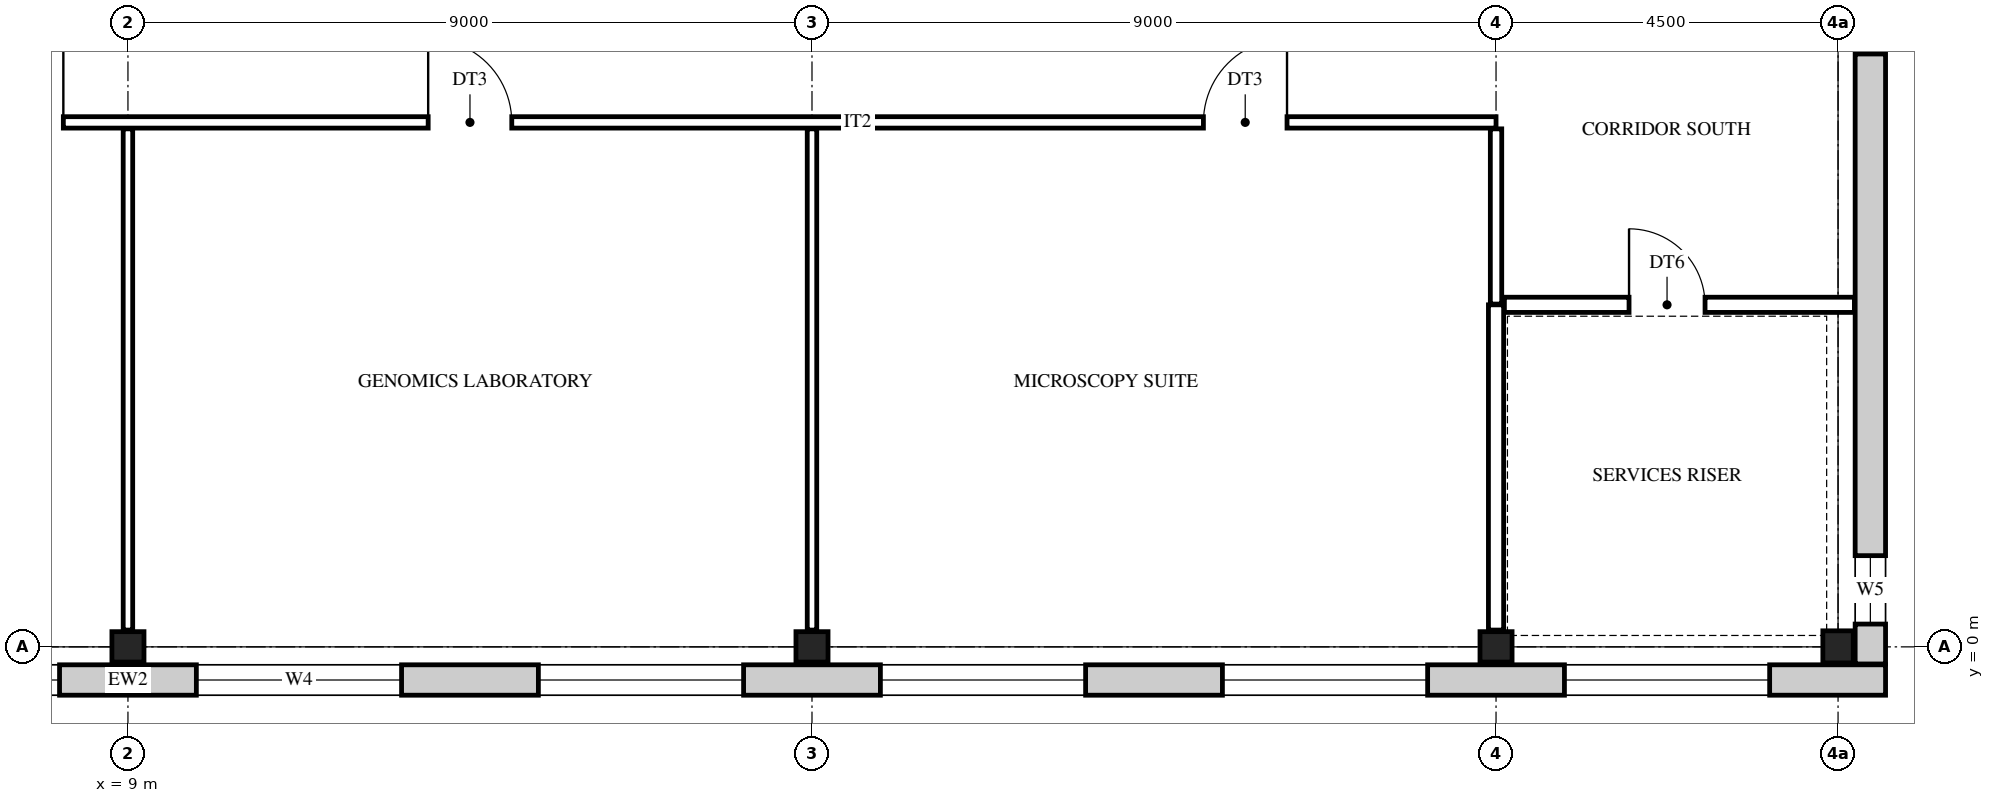
"""IFC4 building model, lengths in metres.
Left out: names, types, materials, properties, quantities, classifications, styles, units other than length and angle.
Written with IfcOpenShell. Run it as: python <this file> out.ifc"""

import sys

from ifc_helpers import new_model, si_unit, direction, frame, frame_2d, origin, origin_2d, place, context, subcontext, project, spatial, rectangle, i_section, extrude, element, fill, save


model = new_model("IFC4")
c1 = context("Model", 3, precision=1e-05, world=origin(), true_north=direction((0.0, 1.0)))
c2 = subcontext(c1, "Body", "Model", "MODEL_VIEW")
j1 = project(units=[si_unit("LENGTHUNIT", "METRE"), si_unit("PLANEANGLEUNIT", "RADIAN")], contexts=[c1])
p1 = place(None, origin())
s1 = spatial("IfcSite", under=j1, at=p1, CompositionType="ELEMENT")
p2 = place(p1, origin())
s2 = spatial("IfcBuilding", under=s1, at=p2, CompositionType="ELEMENT")
p3 = place(p2, frame((0.0, 0.0, 19.2)))
s3 = spatial("IfcBuildingStorey", under=s2, at=p3, CompositionType="ELEMENT", Elevation=19.2)
for number, where, z_axis, x_axis in (
    (1, (9.0, 0.0, 0.0), (0.0, 0.0, 1.0), (0.0, 1.0, 0.0)),
    (2, (18.0, 0.0, 0.0), (0.0, 0.0, 1.0), (0.0, 1.0, 0.0)),
    (3, (27.0, 0.0, 0.0), (0.0, 0.0, 1.0), (0.0, 1.0, 0.0)),
    (4, (31.5, 0.0, 0.0), (0.0, 0.0, 1.0), (1.0, 0.0, 0.0)),
):
    element("IfcColumn", number, at=place(p3, frame(where, z_axis=z_axis, x_axis=x_axis)), inside=s3, PredefinedType="COLUMN", context=c2, shape_type="SweptSolid", body=[
        extrude(i_section(OverallWidth=0.4, OverallDepth=0.422, WebThickness=0.028, FlangeThickness=0.036, at=origin_2d()), origin(), (0.0, 0.0, 1.0), 4.2),
    ])
p4 = place(p3, frame((32.125, -0.436, 0.0), z_axis=(0.0, 0.0, 1.0), x_axis=(-1.0, 0.0, 0.0)))
e5 = element("IfcWall", 5, at=p4, inside=s3, PredefinedType="STANDARD", context=c2, shape_type="SweptSolid", body=[
    extrude(rectangle(XDim=32.75, YDim=0.4, at=frame_2d((16.375, 0.0))), origin(), (0.0, 0.0, 1.0), 4.2),
])
p5 = place(p4, frame((28.525, 0.0, 0.9)))
e6 = element("IfcOpeningElement", 6, at=p5, cuts=e5, PredefinedType="OPENING", context=c2, shape_type="SweptSolid", body=[
    extrude(rectangle(XDim=2.7, YDim=2.5, at=frame_2d((1.35, 1.25))), frame((0.0, 0.21, 0.0), z_axis=(0.0, -1.0, 0.0), x_axis=(1.0, 0.0, 0.0)), (0.0, 0.0, 1.0), 0.42),
])
p6 = place(p4, frame((24.025, 0.0, 0.9)))
e7 = element("IfcOpeningElement", 7, at=p6, cuts=e5, PredefinedType="OPENING", context=c2, shape_type="SweptSolid", body=[
    extrude(rectangle(XDim=2.7, YDim=2.5, at=frame_2d((1.35, 1.25))), frame((0.0, 0.21, 0.0), z_axis=(0.0, -1.0, 0.0), x_axis=(1.0, 0.0, 0.0)), (0.0, 0.0, 1.0), 0.42),
])
p7 = place(p4, frame((19.525, 0.0, 0.9)))
e8 = element("IfcOpeningElement", 8, at=p7, cuts=e5, PredefinedType="OPENING", context=c2, shape_type="SweptSolid", body=[
    extrude(rectangle(XDim=2.7, YDim=2.5, at=frame_2d((1.35, 1.25))), frame((0.0, 0.21, 0.0), z_axis=(0.0, -1.0, 0.0), x_axis=(1.0, 0.0, 0.0)), (0.0, 0.0, 1.0), 0.42),
])
p8 = place(p4, frame((15.025, 0.0, 0.9)))
e9 = element("IfcOpeningElement", 9, at=p8, cuts=e5, PredefinedType="OPENING", context=c2, shape_type="SweptSolid", body=[
    extrude(rectangle(XDim=2.7, YDim=2.5, at=frame_2d((1.35, 1.25))), frame((0.0, 0.21, 0.0), z_axis=(0.0, -1.0, 0.0), x_axis=(1.0, 0.0, 0.0)), (0.0, 0.0, 1.0), 0.42),
])
p9 = place(p4, frame((10.525, 0.0, 0.9)))
e10 = element("IfcOpeningElement", 10, at=p9, cuts=e5, PredefinedType="OPENING", context=c2, shape_type="SweptSolid", body=[
    extrude(rectangle(XDim=2.7, YDim=2.5, at=frame_2d((1.35, 1.25))), frame((0.0, 0.21, 0.0), z_axis=(0.0, -1.0, 0.0), x_axis=(1.0, 0.0, 0.0)), (0.0, 0.0, 1.0), 0.42),
])
p10 = place(p4, frame((6.025, 0.0, 0.9)))
e11 = element("IfcOpeningElement", 11, at=p10, cuts=e5, PredefinedType="OPENING", context=c2, shape_type="SweptSolid", body=[
    extrude(rectangle(XDim=2.7, YDim=2.5, at=frame_2d((1.35, 1.25))), frame((0.0, 0.21, 0.0), z_axis=(0.0, -1.0, 0.0), x_axis=(1.0, 0.0, 0.0)), (0.0, 0.0, 1.0), 0.42),
])
p11 = place(p4, frame((1.525, 0.0, 0.9)))
e12 = element("IfcOpeningElement", 12, at=p11, cuts=e5, PredefinedType="OPENING", context=c2, shape_type="SweptSolid", body=[
    extrude(rectangle(XDim=2.7, YDim=2.5, at=frame_2d((1.35, 1.25))), frame((0.0, 0.21, 0.0), z_axis=(0.0, -1.0, 0.0), x_axis=(1.0, 0.0, 0.0)), (0.0, 0.0, 1.0), 0.42),
])
p12 = place(p3, frame((31.925, 27.225, 0.0), z_axis=(0.0, 0.0, 1.0), x_axis=(0.0, -1.0, 0.0)))
e13 = element("IfcWall", 13, at=p12, inside=s3, PredefinedType="STANDARD", context=c2, shape_type="SweptSolid", body=[
    extrude(rectangle(XDim=27.45, YDim=0.4, at=frame_2d((13.725, 0.0))), origin(), (0.0, 0.0, 1.0), 4.2),
])
p13 = place(p12, frame((26.025, 0.0, 0.9)))
e14 = element("IfcOpeningElement", 14, at=p13, cuts=e13, PredefinedType="OPENING", context=c2, shape_type="SweptSolid", body=[
    extrude(rectangle(XDim=0.9, YDim=2.0, at=frame_2d((0.45, 1.0))), frame((0.0, 0.21, 0.0), z_axis=(0.0, -1.0, 0.0), x_axis=(1.0, 0.0, 0.0)), (0.0, 0.0, 1.0), 0.42),
])
p14 = place(p12, frame((18.525, 0.0, 0.9)))
e15 = element("IfcOpeningElement", 15, at=p14, cuts=e13, PredefinedType="OPENING", context=c2, shape_type="SweptSolid", body=[
    extrude(rectangle(XDim=0.9, YDim=2.0, at=frame_2d((0.45, 1.0))), frame((0.0, 0.21, 0.0), z_axis=(0.0, -1.0, 0.0), x_axis=(1.0, 0.0, 0.0)), (0.0, 0.0, 1.0), 0.42),
])
p15 = place(p12, frame((15.675, 0.0, 1.6)))
e16 = element("IfcOpeningElement", 16, at=p15, cuts=e13, PredefinedType="OPENING", context=c2, shape_type="SweptSolid", body=[
    extrude(rectangle(XDim=0.6, YDim=0.9, at=frame_2d((0.3, 0.45))), frame((0.0, 0.21, 0.0), z_axis=(0.0, -1.0, 0.0), x_axis=(1.0, 0.0, 0.0)), (0.0, 0.0, 1.0), 0.42),
])
p16 = place(p12, frame((11.175, 0.0, 1.6)))
e17 = element("IfcOpeningElement", 17, at=p16, cuts=e13, PredefinedType="OPENING", context=c2, shape_type="SweptSolid", body=[
    extrude(rectangle(XDim=0.6, YDim=0.9, at=frame_2d((0.3, 0.45))), frame((0.0, 0.21, 0.0), z_axis=(0.0, -1.0, 0.0), x_axis=(1.0, 0.0, 0.0)), (0.0, 0.0, 1.0), 0.42),
])
p17 = place(p12, frame((8.025, 0.0, 0.9)))
e18 = element("IfcOpeningElement", 18, at=p17, cuts=e13, PredefinedType="OPENING", context=c2, shape_type="SweptSolid", body=[
    extrude(rectangle(XDim=0.9, YDim=2.0, at=frame_2d((0.45, 1.0))), frame((0.0, 0.21, 0.0), z_axis=(0.0, -1.0, 0.0), x_axis=(1.0, 0.0, 0.0)), (0.0, 0.0, 1.0), 0.42),
])
p18 = place(p12, frame((0.525, 0.0, 0.9)))
e19 = element("IfcOpeningElement", 19, at=p18, cuts=e13, PredefinedType="OPENING", context=c2, shape_type="SweptSolid", body=[
    extrude(rectangle(XDim=0.9, YDim=2.0, at=frame_2d((0.45, 1.0))), frame((0.0, 0.21, 0.0), z_axis=(0.0, -1.0, 0.0), x_axis=(1.0, 0.0, 0.0)), (0.0, 0.0, 1.0), 0.42),
])
for number, where, z_axis, x_axis in (
    (20, (9.0, 0.221, 0.0), (0.0, 0.0, 1.0), (0.0, 1.0, 0.0)),
    (21, (18.0, 0.221, 0.0), (0.0, 0.0, 1.0), (0.0, 1.0, 0.0)),
):
    element("IfcWall", number, at=place(p3, frame(where, z_axis=z_axis, x_axis=x_axis)), inside=s3, PredefinedType="PARTITIONING", context=c2, shape_type="SweptSolid", body=[
        extrude(rectangle(XDim=6.594, YDim=0.125, at=frame_2d((3.297, 0.0))), origin(), (0.0, 0.0, 1.0), 3.537),
    ])
p19 = place(p3, frame((27.0, 0.221, 0.0), z_axis=(0.0, 0.0, 1.0), x_axis=(0.0, 1.0, 0.0)))
e22 = element("IfcWall", 22, at=p19, inside=s3, PredefinedType="PARTITIONING", context=c2, shape_type="SweptSolid", body=[
    extrude(rectangle(XDim=4.279, YDim=0.2, at=frame_2d((2.14, 0.0))), origin(), (0.0, 0.0, 1.0), 3.537),
])
p20 = place(p3, frame((27.0, 4.51, 0.0), z_axis=(0.0, 0.0, 1.0), x_axis=(0.0, 1.0, 0.0)))
e23 = element("IfcWall", 23, at=p20, inside=s3, PredefinedType="PARTITIONING", context=c2, shape_type="SweptSolid", body=[
    extrude(rectangle(XDim=2.305, YDim=0.15, at=frame_2d((1.152, 0.0))), origin(), (0.0, 0.0, 1.0), 3.537),
])
p21 = place(p3, frame((27.11, 4.5, 0.0), z_axis=(0.0, 0.0, 1.0), x_axis=(1.0, 0.0, 0.0)))
e24 = element("IfcWall", 24, at=p21, inside=s3, PredefinedType="PARTITIONING", context=c2, shape_type="SweptSolid", body=[
    extrude(rectangle(XDim=4.605, YDim=0.2, at=frame_2d((2.302, 0.0))), origin(), (0.0, 0.0, 1.0), 3.537),
])
p22 = place(p21, frame((1.64, 0.0, 0.0)))
e25 = element("IfcOpeningElement", 25, at=p22, cuts=e24, PredefinedType="OPENING", context=c2, shape_type="SweptSolid", body=[
    extrude(rectangle(XDim=1.0, YDim=2.1, at=frame_2d((0.5, 1.05))), frame((0.0, 0.11, 0.0), z_axis=(0.0, -1.0, 0.0), x_axis=(1.0, 0.0, 0.0)), (0.0, 0.0, 1.0), 0.22),
])
p23 = place(p3, frame((6.9, 6.9, 0.0), z_axis=(0.0, 0.0, 1.0), x_axis=(1.0, 0.0, 0.0)))
e26 = element("IfcWall", 26, at=p23, inside=s3, PredefinedType="PARTITIONING", context=c2, shape_type="SweptSolid", body=[
    extrude(rectangle(XDim=20.1, YDim=0.15, at=frame_2d((10.05, 0.0))), origin(), (0.0, 0.0, 1.0), 3.537),
])
p24 = place(p23, frame((0.15, 0.0, 0.0)))
e27 = element("IfcOpeningElement", 27, at=p24, cuts=e26, PredefinedType="OPENING", context=c2, shape_type="SweptSolid", body=[
    extrude(rectangle(XDim=1.1, YDim=2.1, at=frame_2d((0.55, 1.05))), frame((0.0, 0.085, 0.0), z_axis=(0.0, -1.0, 0.0), x_axis=(1.0, 0.0, 0.0)), (0.0, 0.0, 1.0), 0.17),
])
p25 = place(p23, frame((6.05, 0.0, 0.0)))
e28 = element("IfcOpeningElement", 28, at=p25, cuts=e26, PredefinedType="OPENING", context=c2, shape_type="SweptSolid", body=[
    extrude(rectangle(XDim=1.1, YDim=2.1, at=frame_2d((0.55, 1.05))), frame((0.0, 0.085, 0.0), z_axis=(0.0, -1.0, 0.0), x_axis=(1.0, 0.0, 0.0)), (0.0, 0.0, 1.0), 0.17),
])
p26 = place(p23, frame((16.25, 0.0, 0.0)))
e29 = element("IfcOpeningElement", 29, at=p26, cuts=e26, PredefinedType="OPENING", context=c2, shape_type="SweptSolid", body=[
    extrude(rectangle(XDim=1.1, YDim=2.1, at=frame_2d((0.55, 1.05))), frame((0.0, 0.085, 0.0), z_axis=(0.0, -1.0, 0.0), x_axis=(1.0, 0.0, 0.0)), (0.0, 0.0, 1.0), 0.17),
])
p27 = place(p6, origin())
e30 = element("IfcWindow", 30, at=p27, inside=s3, PartitioningType="SINGLE_PANEL", PredefinedType="WINDOW", context=c2, shape_type="SweptSolid", body=[
    extrude(rectangle(XDim=2.7, YDim=2.5, at=frame_2d((1.35, 1.25))), frame((0.0, 0.03, 0.0), z_axis=(0.0, -1.0, 0.0), x_axis=(1.0, 0.0, 0.0)), (0.0, 0.0, 1.0), 0.06),
])
fill(e7, e30)
p28 = place(p7, origin())
e31 = element("IfcWindow", 31, at=p28, inside=s3, PartitioningType="SINGLE_PANEL", PredefinedType="WINDOW", context=c2, shape_type="SweptSolid", body=[
    extrude(rectangle(XDim=2.7, YDim=2.5, at=frame_2d((1.35, 1.25))), frame((0.0, 0.03, 0.0), z_axis=(0.0, -1.0, 0.0), x_axis=(1.0, 0.0, 0.0)), (0.0, 0.0, 1.0), 0.06),
])
fill(e8, e31)
p29 = place(p8, origin())
e32 = element("IfcWindow", 32, at=p29, inside=s3, PartitioningType="SINGLE_PANEL", PredefinedType="WINDOW", context=c2, shape_type="SweptSolid", body=[
    extrude(rectangle(XDim=2.7, YDim=2.5, at=frame_2d((1.35, 1.25))), frame((0.0, 0.03, 0.0), z_axis=(0.0, -1.0, 0.0), x_axis=(1.0, 0.0, 0.0)), (0.0, 0.0, 1.0), 0.06),
])
fill(e9, e32)
p30 = place(p9, origin())
e33 = element("IfcWindow", 33, at=p30, inside=s3, PartitioningType="SINGLE_PANEL", PredefinedType="WINDOW", context=c2, shape_type="SweptSolid", body=[
    extrude(rectangle(XDim=2.7, YDim=2.5, at=frame_2d((1.35, 1.25))), frame((0.0, 0.03, 0.0), z_axis=(0.0, -1.0, 0.0), x_axis=(1.0, 0.0, 0.0)), (0.0, 0.0, 1.0), 0.06),
])
fill(e10, e33)
p31 = place(p10, origin())
e34 = element("IfcWindow", 34, at=p31, inside=s3, PartitioningType="SINGLE_PANEL", PredefinedType="WINDOW", context=c2, shape_type="SweptSolid", body=[
    extrude(rectangle(XDim=2.7, YDim=2.5, at=frame_2d((1.35, 1.25))), frame((0.0, 0.03, 0.0), z_axis=(0.0, -1.0, 0.0), x_axis=(1.0, 0.0, 0.0)), (0.0, 0.0, 1.0), 0.06),
])
fill(e11, e34)
p32 = place(p11, origin())
e35 = element("IfcWindow", 35, at=p32, inside=s3, PartitioningType="SINGLE_PANEL", PredefinedType="WINDOW", context=c2, shape_type="SweptSolid", body=[
    extrude(rectangle(XDim=2.7, YDim=2.5, at=frame_2d((1.35, 1.25))), frame((0.0, 0.03, 0.0), z_axis=(0.0, -1.0, 0.0), x_axis=(1.0, 0.0, 0.0)), (0.0, 0.0, 1.0), 0.06),
])
fill(e12, e35)
p33 = place(p13, origin())
e36 = element("IfcWindow", 36, at=p33, inside=s3, PartitioningType="SINGLE_PANEL", PredefinedType="WINDOW", context=c2, shape_type="SweptSolid", body=[
    extrude(rectangle(XDim=0.9, YDim=2.0, at=frame_2d((0.45, 1.0))), frame((0.0, 0.03, 0.0), z_axis=(0.0, -1.0, 0.0), x_axis=(1.0, 0.0, 0.0)), (0.0, 0.0, 1.0), 0.06),
])
fill(e14, e36)
p34 = place(p14, origin())
e37 = element("IfcWindow", 37, at=p34, inside=s3, PartitioningType="SINGLE_PANEL", PredefinedType="WINDOW", context=c2, shape_type="SweptSolid", body=[
    extrude(rectangle(XDim=0.9, YDim=2.0, at=frame_2d((0.45, 1.0))), frame((0.0, 0.03, 0.0), z_axis=(0.0, -1.0, 0.0), x_axis=(1.0, 0.0, 0.0)), (0.0, 0.0, 1.0), 0.06),
])
fill(e15, e37)
p35 = place(p22, frame((1.0, 0.0, 0.0), z_axis=(0.0, 0.0, 1.0), x_axis=(-1.0, 0.0, 0.0)))
e38 = element("IfcDoor", 38, at=p35, inside=s3, OperationType="SINGLE_SWING_LEFT", PredefinedType="DOOR", context=c2, shape_type="SweptSolid", body=[
    extrude(rectangle(XDim=1.0, YDim=2.1, at=frame_2d((0.5, 1.05))), frame((0.0, 0.025, 0.0), z_axis=(0.0, -1.0, 0.0), x_axis=(1.0, 0.0, 0.0)), (0.0, 0.0, 1.0), 0.05),
])
fill(e25, e38)
p36 = place(p24, frame((1.1, 0.0, 0.0), z_axis=(0.0, 0.0, 1.0), x_axis=(-1.0, 0.0, 0.0)))
e39 = element("IfcDoor", 39, at=p36, inside=s3, OperationType="SINGLE_SWING_RIGHT", PredefinedType="DOOR", context=c2, shape_type="SweptSolid", body=[
    extrude(rectangle(XDim=1.1, YDim=2.1, at=frame_2d((0.55, 1.05))), frame((0.0, 0.025, 0.0), z_axis=(0.0, -1.0, 0.0), x_axis=(1.0, 0.0, 0.0)), (0.0, 0.0, 1.0), 0.05),
])
fill(e27, e39)
p37 = place(p25, frame((1.1, 0.0, 0.0), z_axis=(0.0, 0.0, 1.0), x_axis=(-1.0, 0.0, 0.0)))
e40 = element("IfcDoor", 40, at=p37, inside=s3, OperationType="SINGLE_SWING_LEFT", PredefinedType="DOOR", context=c2, shape_type="SweptSolid", body=[
    extrude(rectangle(XDim=1.1, YDim=2.1, at=frame_2d((0.55, 1.05))), frame((0.0, 0.025, 0.0), z_axis=(0.0, -1.0, 0.0), x_axis=(1.0, 0.0, 0.0)), (0.0, 0.0, 1.0), 0.05),
])
fill(e28, e40)
p38 = place(p26, frame((1.1, 0.0, 0.0), z_axis=(0.0, 0.0, 1.0), x_axis=(-1.0, 0.0, 0.0)))
e41 = element("IfcDoor", 41, at=p38, inside=s3, OperationType="SINGLE_SWING_RIGHT", PredefinedType="DOOR", context=c2, shape_type="SweptSolid", body=[
    extrude(rectangle(XDim=1.1, YDim=2.1, at=frame_2d((0.55, 1.05))), frame((0.0, 0.025, 0.0), z_axis=(0.0, -1.0, 0.0), x_axis=(1.0, 0.0, 0.0)), (0.0, 0.0, 1.0), 0.05),
])
fill(e29, e41)
save(model, sys.argv[1])
